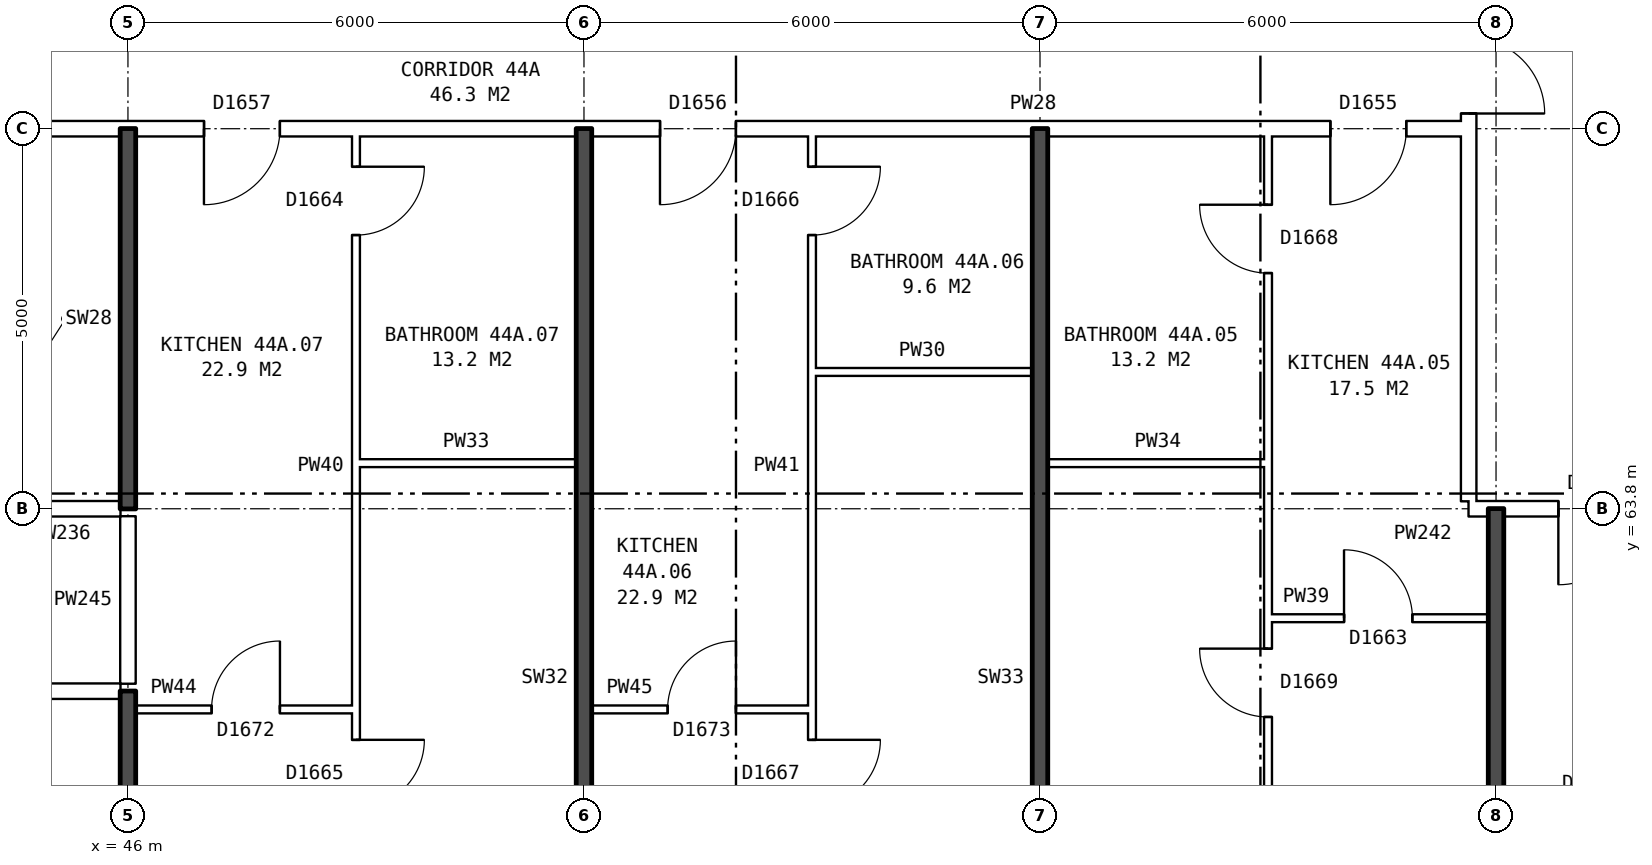
"""IFC4 building model, lengths in metres.
Left out: names, types, materials, properties, quantities, classifications, styles, units other than length and angle.
Written with IfcOpenShell. Run it as: python <this file> out.ifc"""

import sys

from ifc_helpers import new_model, si_unit, direction, frame, frame_2d, origin, place, context, subcontext, project, spatial, rectangle, extrude, element, fill, save


model = new_model("IFC4")
c1 = context("Model", 3, precision=1e-05, world=origin(), true_north=direction((0.0, 1.0)))
c2 = subcontext(c1, "Body", "Model", "MODEL_VIEW")
j1 = project(units=[si_unit("LENGTHUNIT", "METRE"), si_unit("PLANEANGLEUNIT", "RADIAN")], contexts=[c1])
p1 = place(None, origin())
s1 = spatial("IfcSite", under=j1, at=p1, CompositionType="ELEMENT")
p2 = place(p1, origin())
s2 = spatial("IfcBuilding", under=s1, at=p2, CompositionType="ELEMENT")
p3 = place(p2, frame((0.0, 0.0, 157.8)))
s3 = spatial("IfcBuildingStorey", under=s2, at=p3, CompositionType="ELEMENT", Elevation=157.8)
p4 = place(p3, frame((63.64, 63.9, 0.0), z_axis=(0.0, 0.0, 1.0), x_axis=(0.0, 1.0, 0.0)))
e1 = element("IfcWall", 1, at=p4, inside=s3, PredefinedType="PARTITIONING", context=c2, shape_type="SweptSolid", body=[
    extrude(rectangle(XDim=12.2, YDim=0.2, at=frame_2d((6.1, 0.0))), origin(), (0.0, 0.0, 1.0), 2.85),
])
p5 = place(p4, frame((5.1, 0.0, 0.0)))
e2 = element("IfcOpeningElement", 2, at=p5, cuts=e1, PredefinedType="OPENING", context=c2, shape_type="SweptSolid", body=[
    extrude(rectangle(XDim=2.0, YDim=2.1, at=frame_2d((1.0, 1.05))), frame((0.0, 0.11, 0.0), z_axis=(0.0, -1.0, 0.0), x_axis=(1.0, 0.0, 0.0)), (0.0, 0.0, 1.0), 0.22),
])
p6 = place(p3, frame((46.1, 61.16, 0.0), z_axis=(0.0, 0.0, 1.0), x_axis=(1.0, 0.0, 0.0)))
e3 = element("IfcWall", 3, at=p6, inside=s3, PredefinedType="PARTITIONING", context=c2, shape_type="SweptSolid", body=[
    extrude(rectangle(XDim=2.9, YDim=0.1, at=frame_2d((1.45, 0.0))), origin(), (0.0, 0.0, 1.0), 2.85),
])
p7 = place(p6, frame((1.0, 0.0, 0.0)))
e4 = element("IfcOpeningElement", 4, at=p7, cuts=e3, PredefinedType="OPENING", context=c2, shape_type="SweptSolid", body=[
    extrude(rectangle(XDim=0.9, YDim=2.1, at=frame_2d((0.45, 1.05))), frame((0.0, 0.06, 0.0), z_axis=(0.0, -1.0, 0.0), x_axis=(1.0, 0.0, 0.0)), (0.0, 0.0, 1.0), 0.12),
])
p8 = place(p3, frame((52.1, 61.16, 0.0), z_axis=(0.0, 0.0, 1.0), x_axis=(1.0, 0.0, 0.0)))
e5 = element("IfcWall", 5, at=p8, inside=s3, PredefinedType="PARTITIONING", context=c2, shape_type="SweptSolid", body=[
    extrude(rectangle(XDim=2.9, YDim=0.1, at=frame_2d((1.45, 0.0))), origin(), (0.0, 0.0, 1.0), 2.85),
])
p9 = place(p8, frame((1.0, 0.0, 0.0)))
e6 = element("IfcOpeningElement", 6, at=p9, cuts=e5, PredefinedType="OPENING", context=c2, shape_type="SweptSolid", body=[
    extrude(rectangle(XDim=0.9, YDim=2.1, at=frame_2d((0.45, 1.05))), frame((0.0, 0.06, 0.0), z_axis=(0.0, -1.0, 0.0), x_axis=(1.0, 0.0, 0.0)), (0.0, 0.0, 1.0), 0.12),
])
p10 = place(p3, frame((28.86, 61.4, 0.0), z_axis=(0.0, 0.0, 1.0), x_axis=(1.0, 0.0, 0.0)))
e7 = element("IfcWall", 7, at=p10, inside=s3, PredefinedType="PARTITIONING", context=c2, shape_type="SweptSolid", body=[
    extrude(rectangle(XDim=17.04, YDim=0.2, at=frame_2d((8.52, 0.0))), origin(), (0.0, 0.0, 1.0), 2.85),
])
p11 = place(p10, frame((14.59, 0.0, 0.0)))
e8 = element("IfcOpeningElement", 8, at=p11, cuts=e7, PredefinedType="OPENING", context=c2, shape_type="SweptSolid", body=[
    extrude(rectangle(XDim=1.0, YDim=2.1, at=frame_2d((0.5, 1.05))), frame((0.0, 0.11, 0.0), z_axis=(0.0, -1.0, 0.0), x_axis=(1.0, 0.0, 0.0)), (0.0, 0.0, 1.0), 0.22),
])
p12 = place(p10, frame((7.64, 0.0, 0.0)))
e9 = element("IfcOpeningElement", 9, at=p12, cuts=e7, PredefinedType="OPENING", context=c2, shape_type="SweptSolid", body=[
    extrude(rectangle(XDim=1.0, YDim=2.1, at=frame_2d((0.5, 1.05))), frame((0.0, 0.11, 0.0), z_axis=(0.0, -1.0, 0.0), x_axis=(1.0, 0.0, 0.0)), (0.0, 0.0, 1.0), 0.22),
])
p13 = place(p3, frame((61.0, 62.36, 0.0), z_axis=(0.0, 0.0, 1.0), x_axis=(1.0, 0.0, 0.0)))
e10 = element("IfcWall", 10, at=p13, inside=s3, PredefinedType="PARTITIONING", context=c2, shape_type="SweptSolid", body=[
    extrude(rectangle(XDim=2.9, YDim=0.1, at=frame_2d((1.45, 0.0))), origin(), (0.0, 0.0, 1.0), 2.85),
])
p14 = place(p13, frame((1.0, 0.0, 0.0)))
e11 = element("IfcOpeningElement", 11, at=p14, cuts=e10, PredefinedType="OPENING", context=c2, shape_type="SweptSolid", body=[
    extrude(rectangle(XDim=0.9, YDim=2.1, at=frame_2d((0.45, 1.05))), frame((0.0, 0.06, 0.0), z_axis=(0.0, -1.0, 0.0), x_axis=(1.0, 0.0, 0.0)), (0.0, 0.0, 1.0), 0.12),
])
p15 = place(p3, frame((44.36, 63.8, 0.0), z_axis=(0.0, 0.0, 1.0), x_axis=(1.0, 0.0, 0.0)))
e12 = element("IfcWall", 12, at=p15, inside=s3, PredefinedType="PARTITIONING", context=c2, shape_type="SweptSolid", body=[
    extrude(rectangle(XDim=1.54, YDim=0.2, at=frame_2d((0.77, 0.0))), origin(), (0.0, 0.0, 1.0), 2.85),
])
p16 = place(p3, frame((63.64, 63.8, 0.0), z_axis=(0.0, 0.0, 1.0), x_axis=(1.0, 0.0, 0.0)))
e13 = element("IfcWall", 13, at=p16, inside=s3, PredefinedType="PARTITIONING", context=c2, shape_type="SweptSolid", body=[
    extrude(rectangle(XDim=3.0, YDim=0.2, at=frame_2d((1.5, 0.0))), origin(), (0.0, 0.0, 1.0), 2.85),
])
p17 = place(p16, frame((1.18, 0.0, 0.0)))
e14 = element("IfcOpeningElement", 14, at=p17, cuts=e13, PredefinedType="OPENING", context=c2, shape_type="SweptSolid", body=[
    extrude(rectangle(XDim=1.0, YDim=2.1, at=frame_2d((0.5, 1.05))), frame((0.0, 0.11, 0.0), z_axis=(0.0, -1.0, 0.0), x_axis=(1.0, 0.0, 0.0)), (0.0, 0.0, 1.0), 0.22),
])
for number, where, z_axis, x_axis in (
    (15, (49.0, 64.4, 0.0), (0.0, 0.0, 1.0), (1.0, 0.0, 0.0)),
    (16, (58.1, 64.4, 0.0), (0.0, 0.0, 1.0), (1.0, 0.0, 0.0)),
    (17, (55.0, 65.6, 0.0), (0.0, 0.0, 1.0), (1.0, 0.0, 0.0)),
):
    element("IfcWall", number, at=place(p3, frame(where, z_axis=z_axis, x_axis=x_axis)), inside=s3, PredefinedType="PARTITIONING", context=c2, shape_type="SweptSolid", body=[
        extrude(rectangle(XDim=2.9, YDim=0.1, at=frame_2d((1.45, 0.0))), origin(), (0.0, 0.0, 1.0), 2.85),
    ])
p18 = place(p3, frame((44.36, 68.8, 0.0), z_axis=(0.0, 0.0, 1.0), x_axis=(1.0, 0.0, 0.0)))
e18 = element("IfcWall", 18, at=p18, inside=s3, PredefinedType="PARTITIONING", context=c2, shape_type="SweptSolid", body=[
    extrude(rectangle(XDim=19.28, YDim=0.2, at=frame_2d((9.64, 0.0))), origin(), (0.0, 0.0, 1.0), 2.85),
])
p19 = place(p18, frame((17.46, 0.0, 0.0)))
e19 = element("IfcOpeningElement", 19, at=p19, cuts=e18, PredefinedType="OPENING", context=c2, shape_type="SweptSolid", body=[
    extrude(rectangle(XDim=1.0, YDim=2.1, at=frame_2d((0.5, 1.05))), frame((0.0, 0.11, 0.0), z_axis=(0.0, -1.0, 0.0), x_axis=(1.0, 0.0, 0.0)), (0.0, 0.0, 1.0), 0.22),
])
p20 = place(p18, frame((8.64, 0.0, 0.0)))
e20 = element("IfcOpeningElement", 20, at=p20, cuts=e18, PredefinedType="OPENING", context=c2, shape_type="SweptSolid", body=[
    extrude(rectangle(XDim=1.0, YDim=2.1, at=frame_2d((0.5, 1.05))), frame((0.0, 0.11, 0.0), z_axis=(0.0, -1.0, 0.0), x_axis=(1.0, 0.0, 0.0)), (0.0, 0.0, 1.0), 0.22),
])
p21 = place(p18, frame((2.64, 0.0, 0.0)))
e21 = element("IfcOpeningElement", 21, at=p21, cuts=e18, PredefinedType="OPENING", context=c2, shape_type="SweptSolid", body=[
    extrude(rectangle(XDim=1.0, YDim=2.1, at=frame_2d((0.5, 1.05))), frame((0.0, 0.11, 0.0), z_axis=(0.0, -1.0, 0.0), x_axis=(1.0, 0.0, 0.0)), (0.0, 0.0, 1.0), 0.22),
])
p22 = place(p3, frame((46.0, 54.36, 0.0), z_axis=(0.0, 0.0, 1.0), x_axis=(0.0, 1.0, 0.0)))
e22 = element("IfcWall", 22, at=p22, inside=s3, PredefinedType="SOLIDWALL", context=c2, shape_type="SweptSolid", body=[
    extrude(rectangle(XDim=7.04, YDim=0.2, at=frame_2d((3.52, 0.0))), origin(), (0.0, 0.0, 1.0), 2.85),
])
p23 = place(p3, frame((46.0, 61.5, 0.0), z_axis=(0.0, 0.0, 1.0), x_axis=(0.0, 1.0, 0.0)))
e23 = element("IfcWall", 23, at=p23, inside=s3, PredefinedType="PARTITIONING", context=c2, shape_type="SweptSolid", body=[
    extrude(rectangle(XDim=2.2, YDim=0.2, at=frame_2d((1.1, 0.0))), origin(), (0.0, 0.0, 1.0), 2.85),
])
p24 = place(p3, frame((46.0, 63.8, 0.0), z_axis=(0.0, 0.0, 1.0), x_axis=(0.0, 1.0, 0.0)))
e24 = element("IfcWall", 24, at=p24, inside=s3, PredefinedType="SOLIDWALL", context=c2, shape_type="SweptSolid", body=[
    extrude(rectangle(XDim=5.0, YDim=0.2, at=frame_2d((2.5, 0.0))), origin(), (0.0, 0.0, 1.0), 2.85),
])
p25 = place(p3, frame((49.0, 54.36, 0.0), z_axis=(0.0, 0.0, 1.0), x_axis=(0.0, 1.0, 0.0)))
e25 = element("IfcWall", 25, at=p25, inside=s3, PredefinedType="PARTITIONING", context=c2, shape_type="SweptSolid", body=[
    extrude(rectangle(XDim=14.34, YDim=0.1, at=frame_2d((7.17, 0.0))), origin(), (0.0, 0.0, 1.0), 2.85),
])
p26 = place(p25, frame((5.5, 0.0, 0.0)))
e26 = element("IfcOpeningElement", 26, at=p26, cuts=e25, PredefinedType="OPENING", context=c2, shape_type="SweptSolid", body=[
    extrude(rectangle(XDim=0.9, YDim=2.1, at=frame_2d((0.45, 1.05))), frame((0.0, 0.06, 0.0), z_axis=(0.0, -1.0, 0.0), x_axis=(1.0, 0.0, 0.0)), (0.0, 0.0, 1.0), 0.12),
])
p27 = place(p25, frame((13.04, 0.0, 0.0)))
e27 = element("IfcOpeningElement", 27, at=p27, cuts=e25, PredefinedType="OPENING", context=c2, shape_type="SweptSolid", body=[
    extrude(rectangle(XDim=0.9, YDim=2.1, at=frame_2d((0.45, 1.05))), frame((0.0, 0.06, 0.0), z_axis=(0.0, -1.0, 0.0), x_axis=(1.0, 0.0, 0.0)), (0.0, 0.0, 1.0), 0.12),
])
p28 = place(p3, frame((52.0, 54.36, 0.0), z_axis=(0.0, 0.0, 1.0), x_axis=(0.0, 1.0, 0.0)))
e28 = element("IfcWall", 28, at=p28, inside=s3, PredefinedType="SOLIDWALL", context=c2, shape_type="SweptSolid", body=[
    extrude(rectangle(XDim=14.44, YDim=0.2, at=frame_2d((7.22, 0.0))), origin(), (0.0, 0.0, 1.0), 2.85),
])
p29 = place(p3, frame((55.0, 54.36, 0.0), z_axis=(0.0, 0.0, 1.0), x_axis=(0.0, 1.0, 0.0)))
e29 = element("IfcWall", 29, at=p29, inside=s3, PredefinedType="PARTITIONING", context=c2, shape_type="SweptSolid", body=[
    extrude(rectangle(XDim=14.34, YDim=0.1, at=frame_2d((7.17, 0.0))), origin(), (0.0, 0.0, 1.0), 2.85),
])
p30 = place(p29, frame((5.5, 0.0, 0.0)))
e30 = element("IfcOpeningElement", 30, at=p30, cuts=e29, PredefinedType="OPENING", context=c2, shape_type="SweptSolid", body=[
    extrude(rectangle(XDim=0.9, YDim=2.1, at=frame_2d((0.45, 1.05))), frame((0.0, 0.06, 0.0), z_axis=(0.0, -1.0, 0.0), x_axis=(1.0, 0.0, 0.0)), (0.0, 0.0, 1.0), 0.12),
])
p31 = place(p29, frame((13.04, 0.0, 0.0)))
e31 = element("IfcOpeningElement", 31, at=p31, cuts=e29, PredefinedType="OPENING", context=c2, shape_type="SweptSolid", body=[
    extrude(rectangle(XDim=0.9, YDim=2.1, at=frame_2d((0.45, 1.05))), frame((0.0, 0.06, 0.0), z_axis=(0.0, -1.0, 0.0), x_axis=(1.0, 0.0, 0.0)), (0.0, 0.0, 1.0), 0.12),
])
p32 = place(p3, frame((58.0, 54.36, 0.0), z_axis=(0.0, 0.0, 1.0), x_axis=(0.0, 1.0, 0.0)))
e32 = element("IfcWall", 32, at=p32, inside=s3, PredefinedType="SOLIDWALL", context=c2, shape_type="SweptSolid", body=[
    extrude(rectangle(XDim=14.44, YDim=0.2, at=frame_2d((7.22, 0.0))), origin(), (0.0, 0.0, 1.0), 2.85),
])
p33 = place(p3, frame((61.0, 54.36, 0.0), z_axis=(0.0, 0.0, 1.0), x_axis=(0.0, 1.0, 0.0)))
e33 = element("IfcWall", 33, at=p33, inside=s3, PredefinedType="PARTITIONING", context=c2, shape_type="SweptSolid", body=[
    extrude(rectangle(XDim=14.34, YDim=0.1, at=frame_2d((7.17, 0.0))), origin(), (0.0, 0.0, 1.0), 2.85),
])
p34 = place(p33, frame((6.7, 0.0, 0.0)))
e34 = element("IfcOpeningElement", 34, at=p34, cuts=e33, PredefinedType="OPENING", context=c2, shape_type="SweptSolid", body=[
    extrude(rectangle(XDim=0.9, YDim=2.1, at=frame_2d((0.45, 1.05))), frame((0.0, 0.06, 0.0), z_axis=(0.0, -1.0, 0.0), x_axis=(1.0, 0.0, 0.0)), (0.0, 0.0, 1.0), 0.12),
])
p35 = place(p33, frame((12.54, 0.0, 0.0)))
e35 = element("IfcOpeningElement", 35, at=p35, cuts=e33, PredefinedType="OPENING", context=c2, shape_type="SweptSolid", body=[
    extrude(rectangle(XDim=0.9, YDim=2.1, at=frame_2d((0.45, 1.05))), frame((0.0, 0.06, 0.0), z_axis=(0.0, -1.0, 0.0), x_axis=(1.0, 0.0, 0.0)), (0.0, 0.0, 1.0), 0.12),
])
p36 = place(p3, frame((64.0, 54.36, 0.0), z_axis=(0.0, 0.0, 1.0), x_axis=(0.0, 1.0, 0.0)))
e36 = element("IfcWall", 36, at=p36, inside=s3, PredefinedType="SOLIDWALL", context=c2, shape_type="SweptSolid", body=[
    extrude(rectangle(XDim=9.44, YDim=0.2, at=frame_2d((4.72, 0.0))), origin(), (0.0, 0.0, 1.0), 2.85),
])
p37 = place(p5, frame((2.0, 0.0, 0.0), z_axis=(0.0, 0.0, 1.0), x_axis=(-1.0, 0.0, 0.0)))
e37 = element("IfcDoor", 37, at=p37, inside=s3, OperationType="DOUBLE_DOOR_SINGLE_SWING", PredefinedType="DOOR", context=c2, shape_type="SweptSolid", body=[
    extrude(rectangle(XDim=2.0, YDim=2.1, at=frame_2d((1.0, 1.05))), frame((0.0, 0.025, 0.0), z_axis=(0.0, -1.0, 0.0), x_axis=(1.0, 0.0, 0.0)), (0.0, 0.0, 1.0), 0.05),
])
fill(e2, e37)
p38 = place(p17, frame((1.0, 0.0, 0.0), z_axis=(0.0, 0.0, 1.0), x_axis=(-1.0, 0.0, 0.0)))
e38 = element("IfcDoor", 38, at=p38, inside=s3, OperationType="SINGLE_SWING_RIGHT", PredefinedType="DOOR", context=c2, shape_type="SweptSolid", body=[
    extrude(rectangle(XDim=1.0, YDim=2.1, at=frame_2d((0.5, 1.05))), frame((0.0, 0.025, 0.0), z_axis=(0.0, -1.0, 0.0), x_axis=(1.0, 0.0, 0.0)), (0.0, 0.0, 1.0), 0.05),
])
fill(e14, e38)
p39 = place(p34, origin())
e39 = element("IfcDoor", 39, at=p39, inside=s3, OperationType="SINGLE_SWING_RIGHT", PredefinedType="DOOR", context=c2, shape_type="SweptSolid", body=[
    extrude(rectangle(XDim=0.9, YDim=2.1, at=frame_2d((0.45, 1.05))), frame((0.0, 0.025, 0.0), z_axis=(0.0, -1.0, 0.0), x_axis=(1.0, 0.0, 0.0)), (0.0, 0.0, 1.0), 0.05),
])
fill(e34, e39)
p40 = place(p19, frame((1.0, 0.0, 0.0), z_axis=(0.0, 0.0, 1.0), x_axis=(-1.0, 0.0, 0.0)))
e40 = element("IfcDoor", 40, at=p40, inside=s3, OperationType="SINGLE_SWING_RIGHT", PredefinedType="DOOR", context=c2, shape_type="SweptSolid", body=[
    extrude(rectangle(XDim=1.0, YDim=2.1, at=frame_2d((0.5, 1.05))), frame((0.0, 0.025, 0.0), z_axis=(0.0, -1.0, 0.0), x_axis=(1.0, 0.0, 0.0)), (0.0, 0.0, 1.0), 0.05),
])
fill(e19, e40)
p41 = place(p14, origin())
e41 = element("IfcDoor", 41, at=p41, inside=s3, OperationType="SINGLE_SWING_LEFT", PredefinedType="DOOR", context=c2, shape_type="SweptSolid", body=[
    extrude(rectangle(XDim=0.9, YDim=2.1, at=frame_2d((0.45, 1.05))), frame((0.0, 0.025, 0.0), z_axis=(0.0, -1.0, 0.0), x_axis=(1.0, 0.0, 0.0)), (0.0, 0.0, 1.0), 0.05),
])
fill(e11, e41)
p42 = place(p35, origin())
e42 = element("IfcDoor", 42, at=p42, inside=s3, OperationType="SINGLE_SWING_RIGHT", PredefinedType="DOOR", context=c2, shape_type="SweptSolid", body=[
    extrude(rectangle(XDim=0.9, YDim=2.1, at=frame_2d((0.45, 1.05))), frame((0.0, 0.025, 0.0), z_axis=(0.0, -1.0, 0.0), x_axis=(1.0, 0.0, 0.0)), (0.0, 0.0, 1.0), 0.05),
])
fill(e35, e42)
p43 = place(p30, frame((0.9, 0.0, 0.0), z_axis=(0.0, 0.0, 1.0), x_axis=(-1.0, 0.0, 0.0)))
e43 = element("IfcDoor", 43, at=p43, inside=s3, OperationType="SINGLE_SWING_LEFT", PredefinedType="DOOR", context=c2, shape_type="SweptSolid", body=[
    extrude(rectangle(XDim=0.9, YDim=2.1, at=frame_2d((0.45, 1.05))), frame((0.0, 0.025, 0.0), z_axis=(0.0, -1.0, 0.0), x_axis=(1.0, 0.0, 0.0)), (0.0, 0.0, 1.0), 0.05),
])
fill(e30, e43)
p44 = place(p20, frame((1.0, 0.0, 0.0), z_axis=(0.0, 0.0, 1.0), x_axis=(-1.0, 0.0, 0.0)))
e44 = element("IfcDoor", 44, at=p44, inside=s3, OperationType="SINGLE_SWING_RIGHT", PredefinedType="DOOR", context=c2, shape_type="SweptSolid", body=[
    extrude(rectangle(XDim=1.0, YDim=2.1, at=frame_2d((0.5, 1.05))), frame((0.0, 0.025, 0.0), z_axis=(0.0, -1.0, 0.0), x_axis=(1.0, 0.0, 0.0)), (0.0, 0.0, 1.0), 0.05),
])
fill(e20, e44)
p45 = place(p9, origin())
e45 = element("IfcDoor", 45, at=p45, inside=s3, OperationType="SINGLE_SWING_RIGHT", PredefinedType="DOOR", context=c2, shape_type="SweptSolid", body=[
    extrude(rectangle(XDim=0.9, YDim=2.1, at=frame_2d((0.45, 1.05))), frame((0.0, 0.025, 0.0), z_axis=(0.0, -1.0, 0.0), x_axis=(1.0, 0.0, 0.0)), (0.0, 0.0, 1.0), 0.05),
])
fill(e6, e45)
p46 = place(p31, frame((0.9, 0.0, 0.0), z_axis=(0.0, 0.0, 1.0), x_axis=(-1.0, 0.0, 0.0)))
e46 = element("IfcDoor", 46, at=p46, inside=s3, OperationType="SINGLE_SWING_LEFT", PredefinedType="DOOR", context=c2, shape_type="SweptSolid", body=[
    extrude(rectangle(XDim=0.9, YDim=2.1, at=frame_2d((0.45, 1.05))), frame((0.0, 0.025, 0.0), z_axis=(0.0, -1.0, 0.0), x_axis=(1.0, 0.0, 0.0)), (0.0, 0.0, 1.0), 0.05),
])
fill(e31, e46)
p47 = place(p26, frame((0.9, 0.0, 0.0), z_axis=(0.0, 0.0, 1.0), x_axis=(-1.0, 0.0, 0.0)))
e47 = element("IfcDoor", 47, at=p47, inside=s3, OperationType="SINGLE_SWING_LEFT", PredefinedType="DOOR", context=c2, shape_type="SweptSolid", body=[
    extrude(rectangle(XDim=0.9, YDim=2.1, at=frame_2d((0.45, 1.05))), frame((0.0, 0.025, 0.0), z_axis=(0.0, -1.0, 0.0), x_axis=(1.0, 0.0, 0.0)), (0.0, 0.0, 1.0), 0.05),
])
fill(e26, e47)
p48 = place(p21, frame((1.0, 0.0, 0.0), z_axis=(0.0, 0.0, 1.0), x_axis=(-1.0, 0.0, 0.0)))
e48 = element("IfcDoor", 48, at=p48, inside=s3, OperationType="SINGLE_SWING_RIGHT", PredefinedType="DOOR", context=c2, shape_type="SweptSolid", body=[
    extrude(rectangle(XDim=1.0, YDim=2.1, at=frame_2d((0.5, 1.05))), frame((0.0, 0.025, 0.0), z_axis=(0.0, -1.0, 0.0), x_axis=(1.0, 0.0, 0.0)), (0.0, 0.0, 1.0), 0.05),
])
fill(e21, e48)
p49 = place(p7, origin())
e49 = element("IfcDoor", 49, at=p49, inside=s3, OperationType="SINGLE_SWING_RIGHT", PredefinedType="DOOR", context=c2, shape_type="SweptSolid", body=[
    extrude(rectangle(XDim=0.9, YDim=2.1, at=frame_2d((0.45, 1.05))), frame((0.0, 0.025, 0.0), z_axis=(0.0, -1.0, 0.0), x_axis=(1.0, 0.0, 0.0)), (0.0, 0.0, 1.0), 0.05),
])
fill(e4, e49)
p50 = place(p27, frame((0.9, 0.0, 0.0), z_axis=(0.0, 0.0, 1.0), x_axis=(-1.0, 0.0, 0.0)))
e50 = element("IfcDoor", 50, at=p50, inside=s3, OperationType="SINGLE_SWING_LEFT", PredefinedType="DOOR", context=c2, shape_type="SweptSolid", body=[
    extrude(rectangle(XDim=0.9, YDim=2.1, at=frame_2d((0.45, 1.05))), frame((0.0, 0.025, 0.0), z_axis=(0.0, -1.0, 0.0), x_axis=(1.0, 0.0, 0.0)), (0.0, 0.0, 1.0), 0.05),
])
fill(e27, e50)
save(model, sys.argv[1])
